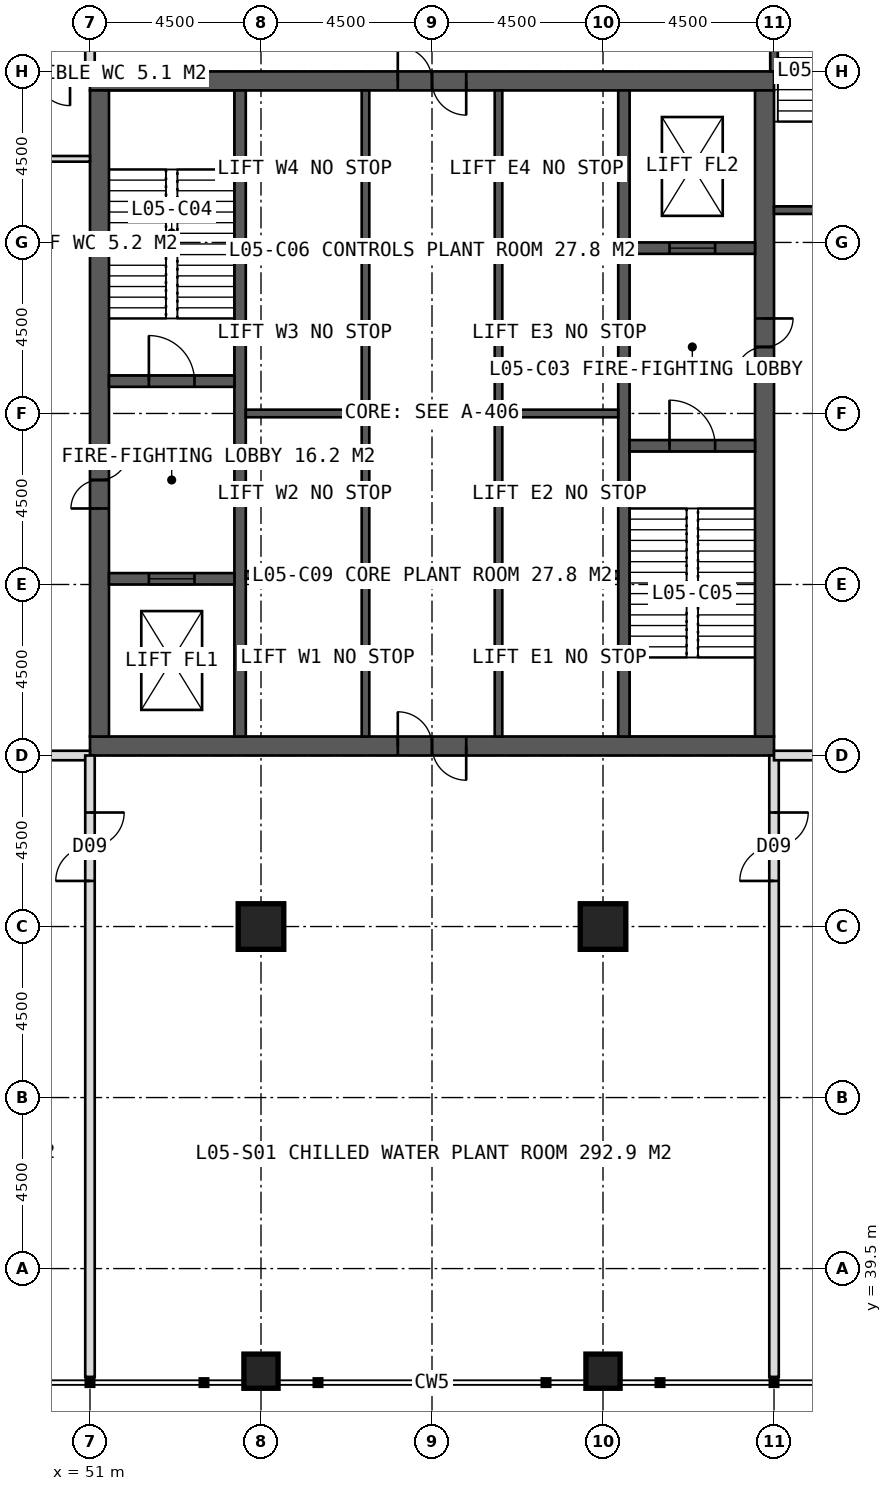
"""IFC4 building model, lengths in metres.
Left out: names, types, materials, properties, quantities, classifications, styles, units other than length and angle.
Written with IfcOpenShell. Run it as: python <this file> out.ifc"""

import sys

from ifc_helpers import new_model, si_unit, direction, frame, frame_2d, origin, origin_2d, place, context, subcontext, project, spatial, rectangle, hollow_rectangle, extrude, element, fill, save


model = new_model("IFC4")
c1 = context("Model", 3, precision=1e-05, world=origin(), true_north=direction((0.0, 1.0)))
c2 = subcontext(c1, "Body", "Model", "MODEL_VIEW")
j1 = project(units=[si_unit("LENGTHUNIT", "METRE"), si_unit("PLANEANGLEUNIT", "RADIAN")], contexts=[c1])
p1 = place(None, origin())
s1 = spatial("IfcSite", under=j1, at=p1, CompositionType="ELEMENT")
p2 = place(p1, origin())
s2 = spatial("IfcBuilding", under=s1, at=p2, CompositionType="ELEMENT")
p3 = place(p2, frame((0.0, 0.0, 26.0)))
s3 = spatial("IfcBuildingStorey", under=s2, at=p3, CompositionType="ELEMENT", Elevation=26.0)
p4 = place(p3, frame((51.0, 70.75, 0.0), z_axis=(0.0, 0.0, 1.0), x_axis=(1.0, 0.0, 0.0)))
e1 = element("IfcWall", 1, at=p4, inside=s3, PredefinedType="SHEAR", context=c2, shape_type="SweptSolid", body=[
    extrude(rectangle(XDim=18.0, YDim=0.5, at=frame_2d((9.0, 0.0))), origin(), (0.0, 0.0, 1.0), 5.0),
])
p5 = place(p4, frame((8.1, 0.0, 0.0)))
e2 = element("IfcOpeningElement", 2, at=p5, cuts=e1, PredefinedType="OPENING", context=c2, shape_type="SweptSolid", body=[
    extrude(rectangle(XDim=1.8, YDim=2.2, at=frame_2d((0.9, 1.1))), frame((0.0, 0.26, 0.0), z_axis=(0.0, -1.0, 0.0), x_axis=(1.0, 0.0, 0.0)), (0.0, 0.0, 1.0), 0.52),
])
p6 = place(p3, frame((51.0, 53.25, 0.0), z_axis=(0.0, 0.0, 1.0), x_axis=(1.0, 0.0, 0.0)))
e3 = element("IfcWall", 3, at=p6, inside=s3, PredefinedType="SHEAR", context=c2, shape_type="SweptSolid", body=[
    extrude(rectangle(XDim=18.0, YDim=0.5, at=frame_2d((9.0, 0.0))), origin(), (0.0, 0.0, 1.0), 5.0),
])
p7 = place(p6, frame((8.1, 0.0, 0.0)))
e4 = element("IfcOpeningElement", 4, at=p7, cuts=e3, PredefinedType="OPENING", context=c2, shape_type="SweptSolid", body=[
    extrude(rectangle(XDim=1.8, YDim=2.2, at=frame_2d((0.9, 1.1))), frame((0.0, 0.26, 0.0), z_axis=(0.0, -1.0, 0.0), x_axis=(1.0, 0.0, 0.0)), (0.0, 0.0, 1.0), 0.52),
])
p8 = place(p3, frame((51.25, 53.5, 0.0), z_axis=(0.0, 0.0, 1.0), x_axis=(0.0, 1.0, 0.0)))
e5 = element("IfcWall", 5, at=p8, inside=s3, PredefinedType="SHEAR", context=c2, shape_type="SweptSolid", body=[
    extrude(rectangle(XDim=17.0, YDim=0.5, at=frame_2d((8.5, 0.0))), origin(), (0.0, 0.0, 1.0), 5.0),
])
p9 = place(p8, frame((6.0, 0.0, 0.0)))
e6 = element("IfcOpeningElement", 6, at=p9, cuts=e5, PredefinedType="OPENING", context=c2, shape_type="SweptSolid", body=[
    extrude(rectangle(XDim=1.5, YDim=2.2, at=frame_2d((0.75, 1.1))), frame((0.0, 0.26, 0.0), z_axis=(0.0, -1.0, 0.0), x_axis=(1.0, 0.0, 0.0)), (0.0, 0.0, 1.0), 0.52),
])
p10 = place(p3, frame((68.75, 53.5, 0.0), z_axis=(0.0, 0.0, 1.0), x_axis=(0.0, 1.0, 0.0)))
e7 = element("IfcWall", 7, at=p10, inside=s3, PredefinedType="SHEAR", context=c2, shape_type="SweptSolid", body=[
    extrude(rectangle(XDim=17.0, YDim=0.5, at=frame_2d((8.5, 0.0))), origin(), (0.0, 0.0, 1.0), 5.0),
])
p11 = place(p10, frame((9.5, 0.0, 0.0)))
e8 = element("IfcOpeningElement", 8, at=p11, cuts=e7, PredefinedType="OPENING", context=c2, shape_type="SweptSolid", body=[
    extrude(rectangle(XDim=1.5, YDim=2.2, at=frame_2d((0.75, 1.1))), frame((0.0, 0.26, 0.0), z_axis=(0.0, -1.0, 0.0), x_axis=(1.0, 0.0, 0.0)), (0.0, 0.0, 1.0), 0.52),
])
for number, where, z_axis, x_axis in (
    (9, (54.95, 53.5, 0.0), (0.0, 0.0, 1.0), (0.0, 1.0, 0.0)),
    (10, (65.05, 53.5, 0.0), (0.0, 0.0, 1.0), (0.0, 1.0, 0.0)),
):
    element("IfcWall", number, at=place(p3, frame(where, z_axis=z_axis, x_axis=x_axis)), inside=s3, PredefinedType="SHEAR", context=c2, shape_type="SweptSolid", body=[
        extrude(rectangle(XDim=17.0, YDim=0.3, at=frame_2d((8.5, 0.0))), origin(), (0.0, 0.0, 1.0), 5.0),
    ])
for number, where, z_axis, x_axis in (
    (11, (58.25, 53.5, 0.0), (0.0, 0.0, 1.0), (0.0, 1.0, 0.0)),
    (12, (61.75, 53.5, 0.0), (0.0, 0.0, 1.0), (0.0, 1.0, 0.0)),
):
    element("IfcWall", number, at=place(p3, frame(where, z_axis=z_axis, x_axis=x_axis)), inside=s3, PredefinedType="SHEAR", context=c2, shape_type="SweptSolid", body=[
        extrude(rectangle(XDim=17.0, YDim=0.2, at=frame_2d((8.5, 0.0))), origin(), (0.0, 0.0, 1.0), 5.0),
    ])
for number, where, z_axis, x_axis in (
    (13, (55.1, 57.75, 0.0), (0.0, 0.0, 1.0), (1.0, 0.0, 0.0)),
    (14, (61.85, 57.75, 0.0), (0.0, 0.0, 1.0), (1.0, 0.0, 0.0)),
    (15, (55.1, 62.0, 0.0), (0.0, 0.0, 1.0), (1.0, 0.0, 0.0)),
    (16, (61.85, 62.0, 0.0), (0.0, 0.0, 1.0), (1.0, 0.0, 0.0)),
    (17, (55.1, 66.25, 0.0), (0.0, 0.0, 1.0), (1.0, 0.0, 0.0)),
    (18, (61.85, 66.25, 0.0), (0.0, 0.0, 1.0), (1.0, 0.0, 0.0)),
):
    element("IfcWall", number, at=place(p3, frame(where, z_axis=z_axis, x_axis=x_axis)), inside=s3, PredefinedType="SHEAR", context=c2, shape_type="SweptSolid", body=[
        extrude(rectangle(XDim=3.05, YDim=0.2, at=frame_2d((1.525, 0.0))), origin(), (0.0, 0.0, 1.0), 5.0),
    ])
p12 = place(p3, frame((51.5, 62.85, 0.0), z_axis=(0.0, 0.0, 1.0), x_axis=(1.0, 0.0, 0.0)))
e19 = element("IfcWall", 19, at=p12, inside=s3, PredefinedType="SHEAR", context=c2, shape_type="SweptSolid", body=[
    extrude(rectangle(XDim=3.3, YDim=0.3, at=frame_2d((1.65, 0.0))), origin(), (0.0, 0.0, 1.0), 5.0),
])
p13 = place(p12, frame((1.05, 0.0, 0.0)))
e20 = element("IfcOpeningElement", 20, at=p13, cuts=e19, PredefinedType="OPENING", context=c2, shape_type="SweptSolid", body=[
    extrude(rectangle(XDim=1.2, YDim=2.1, at=frame_2d((0.6, 1.05))), frame((0.0, 0.16, 0.0), z_axis=(0.0, -1.0, 0.0), x_axis=(1.0, 0.0, 0.0)), (0.0, 0.0, 1.0), 0.32),
])
p14 = place(p3, frame((51.5, 57.65, 0.0), z_axis=(0.0, 0.0, 1.0), x_axis=(1.0, 0.0, 0.0)))
e21 = element("IfcWall", 21, at=p14, inside=s3, PredefinedType="SHEAR", context=c2, shape_type="SweptSolid", body=[
    extrude(rectangle(XDim=3.3, YDim=0.3, at=frame_2d((1.65, 0.0))), origin(), (0.0, 0.0, 1.0), 5.0),
])
p15 = place(p14, frame((1.05, 0.0, 0.0)))
e22 = element("IfcOpeningElement", 22, at=p15, cuts=e21, PredefinedType="OPENING", context=c2, shape_type="SweptSolid", body=[
    extrude(rectangle(XDim=1.2, YDim=2.2, at=frame_2d((0.6, 1.1))), frame((0.0, 0.16, 0.0), z_axis=(0.0, -1.0, 0.0), x_axis=(1.0, 0.0, 0.0)), (0.0, 0.0, 1.0), 0.32),
])
p16 = place(p3, frame((65.2, 61.15, 0.0), z_axis=(0.0, 0.0, 1.0), x_axis=(1.0, 0.0, 0.0)))
e23 = element("IfcWall", 23, at=p16, inside=s3, PredefinedType="SHEAR", context=c2, shape_type="SweptSolid", body=[
    extrude(rectangle(XDim=3.3, YDim=0.3, at=frame_2d((1.65, 0.0))), origin(), (0.0, 0.0, 1.0), 5.0),
])
p17 = place(p16, frame((1.05, 0.0, 0.0)))
e24 = element("IfcOpeningElement", 24, at=p17, cuts=e23, PredefinedType="OPENING", context=c2, shape_type="SweptSolid", body=[
    extrude(rectangle(XDim=1.2, YDim=2.1, at=frame_2d((0.6, 1.05))), frame((0.0, 0.16, 0.0), z_axis=(0.0, -1.0, 0.0), x_axis=(1.0, 0.0, 0.0)), (0.0, 0.0, 1.0), 0.32),
])
p18 = place(p3, frame((65.2, 66.35, 0.0), z_axis=(0.0, 0.0, 1.0), x_axis=(1.0, 0.0, 0.0)))
e25 = element("IfcWall", 25, at=p18, inside=s3, PredefinedType="SHEAR", context=c2, shape_type="SweptSolid", body=[
    extrude(rectangle(XDim=3.3, YDim=0.3, at=frame_2d((1.65, 0.0))), origin(), (0.0, 0.0, 1.0), 5.0),
])
p19 = place(p18, frame((1.05, 0.0, 0.0)))
e26 = element("IfcOpeningElement", 26, at=p19, cuts=e25, PredefinedType="OPENING", context=c2, shape_type="SweptSolid", body=[
    extrude(rectangle(XDim=1.2, YDim=2.2, at=frame_2d((0.6, 1.1))), frame((0.0, 0.16, 0.0), z_axis=(0.0, -1.0, 0.0), x_axis=(1.0, 0.0, 0.0)), (0.0, 0.0, 1.0), 0.32),
])
for number, where, z_axis, x_axis in (
    (27, (55.5, 48.5, 0.0), (0.0, 0.0, 1.0), (1.0, 0.0, 0.0)),
    (28, (64.5, 48.5, 0.0), (0.0, 0.0, 1.0), (1.0, 0.0, 0.0)),
):
    element("IfcColumn", number, at=place(p3, frame(where, z_axis=z_axis, x_axis=x_axis)), inside=s3, PredefinedType="COLUMN", context=c2, shape_type="SweptSolid", body=[
        extrude(hollow_rectangle(XDim=1.2, YDim=1.2, WallThickness=0.1, at=origin_2d()), origin(), (0.0, 0.0, 1.0), 5.0),
    ])
for number, where, z_axis, x_axis in (
    (29, (55.5, 36.8, 0.0), (0.0, 0.0, 1.0), (1.0, 0.0, 0.0)),
    (30, (64.5, 36.8, 0.0), (0.0, 0.0, 1.0), (1.0, 0.0, 0.0)),
):
    element("IfcColumn", number, at=place(p3, frame(where, z_axis=z_axis, x_axis=x_axis)), inside=s3, PredefinedType="COLUMN", context=c2, shape_type="SweptSolid", body=[
        extrude(hollow_rectangle(XDim=0.9, YDim=0.9, WallThickness=0.08, at=origin_2d()), origin(), (0.0, 0.0, 1.0), 5.0),
    ])
p20 = place(p3, frame((51.0, 71.0, 0.0), z_axis=(0.0, 0.0, 1.0), x_axis=(0.0, 1.0, 0.0)))
e31 = element("IfcWall", 31, at=p20, inside=s3, PredefinedType="SOLIDWALL", context=c2, shape_type="SweptSolid", body=[
    extrude(rectangle(XDim=16.35, YDim=0.25, at=frame_2d((8.175, 0.0))), origin(), (0.0, 0.0, 1.0), 4.75),
])
p21 = place(p20, frame((1.5, 0.0, 0.0)))
e32 = element("IfcOpeningElement", 32, at=p21, cuts=e31, PredefinedType="OPENING", context=c2, shape_type="SweptSolid", body=[
    extrude(rectangle(XDim=1.8, YDim=2.2, at=frame_2d((0.9, 1.1))), frame((0.0, 0.135, 0.0), z_axis=(0.0, -1.0, 0.0), x_axis=(1.0, 0.0, 0.0)), (0.0, 0.0, 1.0), 0.27),
])
p22 = place(p3, frame((51.0, 71.0, 0.0), z_axis=(0.0, 0.0, 1.0), x_axis=(-1.0, 0.0, 0.0)))
e33 = element("IfcWall", 33, at=p22, inside=s3, PredefinedType="SOLIDWALL", context=c2, shape_type="SweptSolid", body=[
    extrude(rectangle(XDim=16.35, YDim=0.25, at=frame_2d((8.175, 0.0))), origin(), (0.0, 0.0, 1.0), 4.75),
])
p23 = place(p22, frame((0.525, 0.0, 0.0)))
e34 = element("IfcOpeningElement", 34, at=p23, cuts=e33, PredefinedType="OPENING", context=c2, shape_type="SweptSolid", body=[
    extrude(rectangle(XDim=1.8, YDim=2.2, at=frame_2d((0.9, 1.1))), frame((0.0, 0.135, 0.0), z_axis=(0.0, -1.0, 0.0), x_axis=(1.0, 0.0, 0.0)), (0.0, 0.0, 1.0), 0.27),
])
p24 = place(p3, frame((51.0, 53.0, 0.0), z_axis=(0.0, 0.0, 1.0), x_axis=(-1.0, 0.0, 0.0)))
e35 = element("IfcWall", 35, at=p24, inside=s3, PredefinedType="SOLIDWALL", context=c2, shape_type="SweptSolid", body=[
    extrude(rectangle(XDim=16.35, YDim=0.25, at=frame_2d((8.175, 0.0))), origin(), (0.0, 0.0, 1.0), 4.75),
])
p25 = place(p24, frame((1.5, 0.0, 0.0)))
e36 = element("IfcOpeningElement", 36, at=p25, cuts=e35, PredefinedType="OPENING", context=c2, shape_type="SweptSolid", body=[
    extrude(rectangle(XDim=1.8, YDim=2.2, at=frame_2d((0.9, 1.1))), frame((0.0, 0.135, 0.0), z_axis=(0.0, -1.0, 0.0), x_axis=(1.0, 0.0, 0.0)), (0.0, 0.0, 1.0), 0.27),
])
p26 = place(p3, frame((51.0, 53.0, 0.0), z_axis=(0.0, 0.0, 1.0), x_axis=(0.0, -1.0, 0.0)))
e37 = element("IfcWall", 37, at=p26, inside=s3, PredefinedType="SOLIDWALL", context=c2, shape_type="SweptSolid", body=[
    extrude(rectangle(XDim=16.35, YDim=0.25, at=frame_2d((8.175, 0.0))), origin(), (0.0, 0.0, 1.0), 4.75),
])
p27 = place(p26, frame((1.5, 0.0, 0.0)))
e38 = element("IfcOpeningElement", 38, at=p27, cuts=e37, PredefinedType="OPENING", context=c2, shape_type="SweptSolid", body=[
    extrude(rectangle(XDim=1.8, YDim=2.2, at=frame_2d((0.9, 1.1))), frame((0.0, 0.135, 0.0), z_axis=(0.0, -1.0, 0.0), x_axis=(1.0, 0.0, 0.0)), (0.0, 0.0, 1.0), 0.27),
])
p28 = place(p3, frame((69.0, 53.0, 0.0), z_axis=(0.0, 0.0, 1.0), x_axis=(0.0, -1.0, 0.0)))
e39 = element("IfcWall", 39, at=p28, inside=s3, PredefinedType="SOLIDWALL", context=c2, shape_type="SweptSolid", body=[
    extrude(rectangle(XDim=16.35, YDim=0.25, at=frame_2d((8.175, 0.0))), origin(), (0.0, 0.0, 1.0), 4.75),
])
p29 = place(p28, frame((1.5, 0.0, 0.0)))
e40 = element("IfcOpeningElement", 40, at=p29, cuts=e39, PredefinedType="OPENING", context=c2, shape_type="SweptSolid", body=[
    extrude(rectangle(XDim=1.8, YDim=2.2, at=frame_2d((0.9, 1.1))), frame((0.0, 0.135, 0.0), z_axis=(0.0, -1.0, 0.0), x_axis=(1.0, 0.0, 0.0)), (0.0, 0.0, 1.0), 0.27),
])
p30 = place(p3, frame((69.0, 53.0, 0.0), z_axis=(0.0, 0.0, 1.0), x_axis=(1.0, 0.0, 0.0)))
e41 = element("IfcWall", 41, at=p30, inside=s3, PredefinedType="SOLIDWALL", context=c2, shape_type="SweptSolid", body=[
    extrude(rectangle(XDim=16.35, YDim=0.25, at=frame_2d((8.175, 0.0))), origin(), (0.0, 0.0, 1.0), 4.75),
])
p31 = place(p30, frame((1.5, 0.0, 0.0)))
e42 = element("IfcOpeningElement", 42, at=p31, cuts=e41, PredefinedType="OPENING", context=c2, shape_type="SweptSolid", body=[
    extrude(rectangle(XDim=1.8, YDim=2.2, at=frame_2d((0.9, 1.1))), frame((0.0, 0.135, 0.0), z_axis=(0.0, -1.0, 0.0), x_axis=(1.0, 0.0, 0.0)), (0.0, 0.0, 1.0), 0.27),
])
p32 = place(p3, frame((51.0, 66.4, 0.0), z_axis=(0.0, 0.0, 1.0), x_axis=(-1.0, 0.0, 0.0)))
e43 = element("IfcWall", 43, at=p32, inside=s3, PredefinedType="PARTITIONING", context=c2, shape_type="SweptSolid", body=[
    extrude(rectangle(XDim=2.5, YDim=0.15, at=frame_2d((1.25, 0.0))), origin(), (0.0, 0.0, 1.0), 2.95),
])
p33 = place(p3, frame((51.0, 68.7, 0.0), z_axis=(0.0, 0.0, 1.0), x_axis=(-1.0, 0.0, 0.0)))
e44 = element("IfcWall", 44, at=p33, inside=s3, PredefinedType="PARTITIONING", context=c2, shape_type="SweptSolid", body=[
    extrude(rectangle(XDim=2.5, YDim=0.15, at=frame_2d((1.25, 0.0))), origin(), (0.0, 0.0, 1.0), 4.75),
])
p34 = place(p3, frame((58.35, 62.0, 0.0), z_axis=(0.0, 0.0, 1.0), x_axis=(1.0, 0.0, 0.0)))
e45 = element("IfcWall", 45, at=p34, inside=s3, PredefinedType="PARTITIONING", context=c2, shape_type="SweptSolid", body=[
    extrude(rectangle(XDim=3.3, YDim=0.15, at=frame_2d((1.65, 0.0))), origin(), (0.0, 0.0, 1.0), 4.75),
])
p35 = place(p3, frame((69.0, 71.0, 0.0), z_axis=(0.0, 0.0, 1.0), x_axis=(0.0, 1.0, 0.0)))
e46 = element("IfcWall", 46, at=p35, inside=s3, PredefinedType="SOLIDWALL", context=c2, shape_type="SweptSolid", body=[
    extrude(rectangle(XDim=4.1, YDim=0.2, at=frame_2d((2.05, 0.0))), origin(), (0.0, 0.0, 1.0), 4.75),
])
p36 = place(p3, frame((69.0, 67.35, 0.0), z_axis=(0.0, 0.0, 1.0), x_axis=(1.0, 0.0, 0.0)))
e47 = element("IfcWall", 47, at=p36, inside=s3, PredefinedType="SOLIDWALL", context=c2, shape_type="SweptSolid", body=[
    extrude(rectangle(XDim=3.5, YDim=0.2, at=frame_2d((1.75, 0.0))), origin(), (0.0, 0.0, 1.0), 4.75),
])
p37 = place(p23, origin())
e48 = element("IfcDoor", 48, at=p37, inside=s3, OperationType="DOUBLE_DOOR_SINGLE_SWING", PredefinedType="DOOR", context=c2, shape_type="SweptSolid", body=[
    extrude(rectangle(XDim=1.8, YDim=2.2, at=frame_2d((0.9, 1.1))), frame((0.0, 0.025, 0.0), z_axis=(0.0, -1.0, 0.0), x_axis=(1.0, 0.0, 0.0)), (0.0, 0.0, 1.0), 0.05),
])
fill(e34, e48)
p38 = place(p27, origin())
e49 = element("IfcDoor", 49, at=p38, inside=s3, OperationType="DOUBLE_DOOR_SINGLE_SWING", PredefinedType="DOOR", context=c2, shape_type="SweptSolid", body=[
    extrude(rectangle(XDim=1.8, YDim=2.2, at=frame_2d((0.9, 1.1))), frame((0.0, 0.025, 0.0), z_axis=(0.0, -1.0, 0.0), x_axis=(1.0, 0.0, 0.0)), (0.0, 0.0, 1.0), 0.05),
])
fill(e38, e49)
p39 = place(p29, origin())
e50 = element("IfcDoor", 50, at=p39, inside=s3, OperationType="DOUBLE_DOOR_SINGLE_SWING", PredefinedType="DOOR", context=c2, shape_type="SweptSolid", body=[
    extrude(rectangle(XDim=1.8, YDim=2.2, at=frame_2d((0.9, 1.1))), frame((0.0, 0.025, 0.0), z_axis=(0.0, -1.0, 0.0), x_axis=(1.0, 0.0, 0.0)), (0.0, 0.0, 1.0), 0.05),
])
fill(e40, e50)
p40 = place(p9, origin())
e51 = element("IfcDoor", 51, at=p40, inside=s3, OperationType="DOUBLE_DOOR_SINGLE_SWING", PredefinedType="DOOR", context=c2, shape_type="SweptSolid", body=[
    extrude(rectangle(XDim=1.5, YDim=2.2, at=frame_2d((0.75, 1.1))), frame((0.0, 0.025, 0.0), z_axis=(0.0, -1.0, 0.0), x_axis=(1.0, 0.0, 0.0)), (0.0, 0.0, 1.0), 0.05),
])
fill(e6, e51)
p41 = place(p11, origin())
e52 = element("IfcDoor", 52, at=p41, inside=s3, OperationType="DOUBLE_DOOR_SINGLE_SWING", PredefinedType="DOOR", context=c2, shape_type="SweptSolid", body=[
    extrude(rectangle(XDim=1.5, YDim=2.2, at=frame_2d((0.75, 1.1))), frame((0.0, 0.025, 0.0), z_axis=(0.0, -1.0, 0.0), x_axis=(1.0, 0.0, 0.0)), (0.0, 0.0, 1.0), 0.05),
])
fill(e8, e52)
p42 = place(p13, origin())
e53 = element("IfcDoor", 53, at=p42, inside=s3, OperationType="SINGLE_SWING_LEFT", PredefinedType="DOOR", context=c2, shape_type="SweptSolid", body=[
    extrude(rectangle(XDim=1.2, YDim=2.1, at=frame_2d((0.6, 1.05))), frame((0.0, 0.025, 0.0), z_axis=(0.0, -1.0, 0.0), x_axis=(1.0, 0.0, 0.0)), (0.0, 0.0, 1.0), 0.05),
])
fill(e20, e53)
p43 = place(p17, origin())
e54 = element("IfcDoor", 54, at=p43, inside=s3, OperationType="SINGLE_SWING_LEFT", PredefinedType="DOOR", context=c2, shape_type="SweptSolid", body=[
    extrude(rectangle(XDim=1.2, YDim=2.1, at=frame_2d((0.6, 1.05))), frame((0.0, 0.025, 0.0), z_axis=(0.0, -1.0, 0.0), x_axis=(1.0, 0.0, 0.0)), (0.0, 0.0, 1.0), 0.05),
])
fill(e24, e54)
p44 = place(p15, origin())
e55 = element("IfcDoor", 55, at=p44, inside=s3, OperationType="SLIDING_TO_LEFT", PredefinedType="DOOR", context=c2, shape_type="SweptSolid", body=[
    extrude(rectangle(XDim=1.2, YDim=2.2, at=frame_2d((0.6, 1.1))), frame((0.0, 0.025, 0.0), z_axis=(0.0, -1.0, 0.0), x_axis=(1.0, 0.0, 0.0)), (0.0, 0.0, 1.0), 0.05),
])
fill(e22, e55)
p45 = place(p19, origin())
e56 = element("IfcDoor", 56, at=p45, inside=s3, OperationType="SLIDING_TO_LEFT", PredefinedType="DOOR", context=c2, shape_type="SweptSolid", body=[
    extrude(rectangle(XDim=1.2, YDim=2.2, at=frame_2d((0.6, 1.1))), frame((0.0, 0.025, 0.0), z_axis=(0.0, -1.0, 0.0), x_axis=(1.0, 0.0, 0.0)), (0.0, 0.0, 1.0), 0.05),
])
fill(e26, e56)
p46 = place(p5, origin())
e57 = element("IfcDoor", 57, at=p46, inside=s3, OperationType="DOUBLE_DOOR_SINGLE_SWING", PredefinedType="DOOR", context=c2, shape_type="SweptSolid", body=[
    extrude(rectangle(XDim=1.8, YDim=2.2, at=frame_2d((0.9, 1.1))), frame((0.0, 0.025, 0.0), z_axis=(0.0, -1.0, 0.0), x_axis=(1.0, 0.0, 0.0)), (0.0, 0.0, 1.0), 0.05),
])
fill(e2, e57)
p47 = place(p7, origin())
e58 = element("IfcDoor", 58, at=p47, inside=s3, OperationType="DOUBLE_DOOR_SINGLE_SWING", PredefinedType="DOOR", context=c2, shape_type="SweptSolid", body=[
    extrude(rectangle(XDim=1.8, YDim=2.2, at=frame_2d((0.9, 1.1))), frame((0.0, 0.025, 0.0), z_axis=(0.0, -1.0, 0.0), x_axis=(1.0, 0.0, 0.0)), (0.0, 0.0, 1.0), 0.05),
])
fill(e4, e58)
save(model, sys.argv[1])
